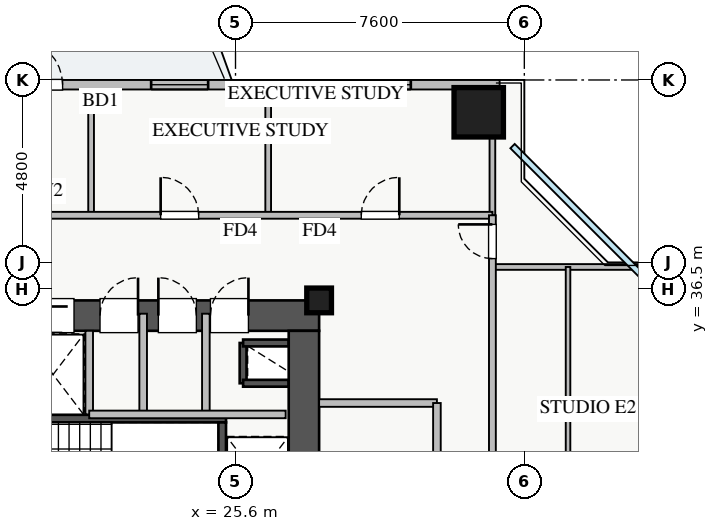
"""IFC4 building model, lengths in metres.
Left out: names, types, materials, properties, quantities, classifications, styles, units other than length and angle.
Written with IfcOpenShell. Run it as: python <this file> out.ifc"""

import sys

from ifc_helpers import new_model, si_unit, direction, frame, frame_2d, origin, origin_2d, place, context, subcontext, project, spatial, rectangle, extrude, source, transform, mapped, element, fill, save


model = new_model("IFC4")
c1 = context("Model", 3, precision=1e-05, world=origin(), true_north=direction((0.0, 1.0)))
c2 = subcontext(c1, "Body", "Model", "MODEL_VIEW")
j1 = project(units=[si_unit("LENGTHUNIT", "METRE"), si_unit("PLANEANGLEUNIT", "RADIAN")], contexts=[c1])
p1 = place(None, origin())
s1 = spatial("IfcSite", under=j1, at=p1, CompositionType="ELEMENT")
p2 = place(p1, origin())
s2 = spatial("IfcBuilding", under=s1, at=p2, CompositionType="ELEMENT")
p3 = place(p2, frame((0.0, 0.0, 60.0)))
s3 = spatial("IfcBuildingStorey", under=s2, at=p3, CompositionType="ELEMENT", Elevation=60.0)
p4 = place(p3, frame((25.8, 34.02, 0.0), z_axis=(0.0, 0.0, 1.0), x_axis=(0.0, 1.0, 0.0)))
e1 = element("IfcWall", 1, at=p4, inside=s3, PredefinedType="SHEAR", context=c2, shape_type="SweptSolid", body=[
    extrude(rectangle(XDim=1.06, YDim=0.18, at=frame_2d((0.53, 0.0))), origin(), (0.0, 0.0, 1.0), 3.07),
])
for number, where, z_axis, x_axis in (
    (2, (25.8, 35.08, 0.0), (0.0, 0.0, 1.0), (1.0, 0.0, 0.0)),
    (3, (25.8, 34.02, 0.0), (0.0, 0.0, 1.0), (1.0, 0.0, 0.0)),
):
    element("IfcWall", number, at=place(p3, frame(where, z_axis=z_axis, x_axis=x_axis)), inside=s3, PredefinedType="SHEAR", context=c2, shape_type="SweptSolid", body=[
        extrude(rectangle(XDim=1.2, YDim=0.18, at=frame_2d((0.6, 0.0))), origin(), (0.0, 0.0, 1.0), 3.07),
    ])
p5 = place(p3, frame((19.88, 33.2, 0.0), z_axis=(0.0, 0.0, 1.0), x_axis=(1.0, 0.0, 0.0)))
e4 = element("IfcWall", 4, at=p5, inside=s3, PredefinedType="SHEAR", context=c2, shape_type="SweptSolid", body=[
    extrude(rectangle(XDim=1.87, YDim=0.18, at=frame_2d((0.935, 0.0))), origin(), (0.0, 0.0, 1.0), 3.07),
])
p6 = place(p3, frame((18.2, 33.09, 0.0), z_axis=(0.0, 0.0, 1.0), x_axis=(1.0, 0.0, 0.0)))
e5 = element("IfcWall", 5, at=p6, inside=s3, PredefinedType="SHEAR", context=c2, shape_type="SweptSolid", body=[
    extrude(rectangle(XDim=7.15, YDim=0.2, at=frame_2d((3.575, 0.0))), origin(), (0.0, 0.0, 1.0), 3.25),
])
p7 = place(p6, frame((0.35, 0.0, 0.0)))
e6 = element("IfcOpeningElement", 6, at=p7, cuts=e5, PredefinedType="OPENING", context=c2, shape_type="SweptSolid", body=[
    extrude(rectangle(XDim=1.1, YDim=2.05, at=frame_2d((0.55, 1.025))), frame((0.0, 0.11, 0.0), z_axis=(0.0, -1.0, 0.0), x_axis=(1.0, 0.0, 0.0)), (0.0, 0.0, 1.0), 0.22),
])
p8 = place(p3, frame((25.25, 30.05, 0.0), z_axis=(0.0, 0.0, 1.0), x_axis=(0.0, 1.0, 0.0)))
e7 = element("IfcWall", 7, at=p8, inside=s3, PredefinedType="SHEAR", context=c2, shape_type="SweptSolid", body=[
    extrude(rectangle(XDim=2.94, YDim=0.2, at=frame_2d((1.47, 0.0))), origin(), (0.0, 0.0, 1.0), 3.25),
])
p9 = place(p3, frame((10.2, 35.8, 0.0), z_axis=(0.0, 0.0, 1.0), x_axis=(1.0, 0.0, 0.0)))
e8 = element("IfcWall", 8, at=p9, inside=s3, PredefinedType="SHEAR", context=c2, shape_type="SweptSolid", body=[
    extrude(rectangle(XDim=17.6, YDim=0.8, at=frame_2d((8.8, 0.0))), origin(), (0.0, 0.0, 1.0), 3.25),
])
p10 = place(p9, frame((1.15, 0.0, 0.0)))
e9 = element("IfcOpeningElement", 9, at=p10, cuts=e8, PredefinedType="OPENING", context=c2, shape_type="SweptSolid", body=[
    extrude(rectangle(XDim=1.1, YDim=2.05, at=frame_2d((0.55, 1.025))), frame((0.0, 0.41, 0.0), z_axis=(0.0, -1.0, 0.0), x_axis=(1.0, 0.0, 0.0)), (0.0, 0.0, 1.0), 0.82),
])
p11 = place(p9, frame((8.3, 0.0, 0.0)))
e10 = element("IfcOpeningElement", 10, at=p11, cuts=e8, PredefinedType="OPENING", context=c2, shape_type="SweptSolid", body=[
    extrude(rectangle(XDim=1.1, YDim=2.05, at=frame_2d((0.55, 1.025))), frame((0.0, 0.41, 0.0), z_axis=(0.0, -1.0, 0.0), x_axis=(1.0, 0.0, 0.0)), (0.0, 0.0, 1.0), 0.82),
])
p12 = place(p9, frame((10.05, 0.0, 0.0)))
e11 = element("IfcOpeningElement", 11, at=p12, cuts=e8, PredefinedType="OPENING", context=c2, shape_type="SweptSolid", body=[
    extrude(rectangle(XDim=1.1, YDim=2.05, at=frame_2d((0.55, 1.025))), frame((0.0, 0.41, 0.0), z_axis=(0.0, -1.0, 0.0), x_axis=(1.0, 0.0, 0.0)), (0.0, 0.0, 1.0), 0.82),
])
p13 = place(p9, frame((14.74, 0.0, 0.0)))
e12 = element("IfcOpeningElement", 12, at=p13, cuts=e8, PredefinedType="OPENING", context=c2, shape_type="SweptSolid", body=[
    extrude(rectangle(XDim=1.0, YDim=2.05, at=frame_2d((0.5, 1.025))), frame((0.0, 0.41, 0.0), z_axis=(0.0, -1.0, 0.0), x_axis=(1.0, 0.0, 0.0)), (0.0, 0.0, 1.0), 0.82),
])
p14 = place(p9, frame((11.835, 0.0, 0.0)))
e13 = element("IfcOpeningElement", 13, at=p14, cuts=e8, PredefinedType="OPENING", context=c2, shape_type="SweptSolid", body=[
    extrude(rectangle(XDim=1.0, YDim=2.05, at=frame_2d((0.5, 1.025))), frame((0.0, 0.41, 0.0), z_axis=(0.0, -1.0, 0.0), x_axis=(1.0, 0.0, 0.0)), (0.0, 0.0, 1.0), 0.82),
])
p15 = place(p9, frame((13.37, 0.0, 0.0)))
e14 = element("IfcOpeningElement", 14, at=p15, cuts=e8, PredefinedType="OPENING", context=c2, shape_type="SweptSolid", body=[
    extrude(rectangle(XDim=1.0, YDim=2.05, at=frame_2d((0.5, 1.025))), frame((0.0, 0.41, 0.0), z_axis=(0.0, -1.0, 0.0), x_axis=(1.0, 0.0, 0.0)), (0.0, 0.0, 1.0), 0.82),
])
p16 = place(p3, frame((27.4, 29.8, 0.0), z_axis=(0.0, 0.0, 1.0), x_axis=(0.0, 1.0, 0.0)))
e15 = element("IfcWall", 15, at=p16, inside=s3, PredefinedType="SHEAR", context=c2, shape_type="SweptSolid", body=[
    extrude(rectangle(XDim=5.6, YDim=0.8, at=frame_2d((2.8, 0.0))), origin(), (0.0, 0.0, 1.0), 3.25),
])
p17 = place(p16, frame((1.1, 0.0, 0.0)))
e16 = element("IfcOpeningElement", 16, at=p17, cuts=e15, PredefinedType="OPENING", context=c2, shape_type="SweptSolid", body=[
    extrude(rectangle(XDim=1.3, YDim=2.05, at=frame_2d((0.65, 1.025))), frame((0.0, 0.41, 0.0), z_axis=(0.0, -1.0, 0.0), x_axis=(1.0, 0.0, 0.0)), (0.0, 0.0, 1.0), 0.82),
])
m1 = source(origin(), c2, "Body", "SweptSolid", [
    extrude(rectangle(XDim=0.65, YDim=0.65, at=origin_2d()), origin(), (0.0, 0.0, 1.0), 3.25),
])
p18 = place(p3, frame((27.8, 36.2, 0.0), z_axis=(0.0, 0.0, 1.0), x_axis=(1.0, 0.0, 0.0)))
e17 = element("IfcColumn", 17, at=p18, inside=s3, PredefinedType="PILASTER", context=c2, shape_type="MappedRepresentation", body=[
    mapped(m1, transform((0.0, 0.0, 0.0), x_axis=(1.0, 0.0, 0.0), y_axis=(0.0, 1.0, 0.0), z_axis=(0.0, 0.0, 1.0), scale=1.0)),
])
m2 = source(origin(), c2, "Body", "SweptSolid", [
    extrude(rectangle(XDim=1.3, YDim=1.3, at=origin_2d()), origin(), (0.0, 0.0, 1.0), 3.25),
])
p19 = place(p3, frame((32.0, 41.15, 0.0), z_axis=(0.0, 0.0, 1.0), x_axis=(1.0, 0.0, 0.0)))
e18 = element("IfcColumn", 18, at=p19, inside=s3, PredefinedType="COLUMN", context=c2, shape_type="MappedRepresentation", body=[
    mapped(m2, transform((0.0, 0.0, 0.0), x_axis=(1.0, 0.0, 0.0), y_axis=(0.0, 1.0, 0.0), z_axis=(0.0, 0.0, 1.0), scale=1.0)),
])
p20 = place(p3, frame((5.45, 41.875, 0.0), z_axis=(0.0, 0.0, 1.0), x_axis=(1.0, 0.0, 0.0)))
e19 = element("IfcWall", 19, at=p20, inside=s3, PredefinedType="STANDARD", context=c2, shape_type="SweptSolid", body=[
    extrude(rectangle(XDim=27.1, YDim=0.25, at=frame_2d((13.55, 0.0))), origin(), (0.0, 0.0, 1.0), 2.61),
])
p21 = place(p20, frame((14.4, 0.0, 0.0)))
e20 = element("IfcOpeningElement", 20, at=p21, cuts=e19, PredefinedType="OPENING", context=c2, shape_type="SweptSolid", body=[
    extrude(rectangle(XDim=1.2, YDim=2.1, at=frame_2d((0.6, 1.05))), frame((0.0, 0.135, 0.0), z_axis=(0.0, -1.0, 0.0), x_axis=(1.0, 0.0, 0.0)), (0.0, 0.0, 1.0), 0.27),
])
p22 = place(p20, frame((1.465, 0.0, 0.9)))
e21 = element("IfcOpeningElement", 21, at=p22, cuts=e19, PredefinedType="OPENING", context=c2, shape_type="SweptSolid", body=[
    extrude(rectangle(XDim=1.5, YDim=1.5, at=frame_2d((0.75, 0.75))), frame((0.0, 0.135, 0.0), z_axis=(0.0, -1.0, 0.0), x_axis=(1.0, 0.0, 0.0)), (0.0, 0.0, 1.0), 0.27),
])
p23 = place(p20, frame((9.263, 0.0, 0.9)))
e22 = element("IfcOpeningElement", 22, at=p23, cuts=e19, PredefinedType="OPENING", context=c2, shape_type="SweptSolid", body=[
    extrude(rectangle(XDim=1.8, YDim=1.45, at=frame_2d((0.9, 0.725))), frame((0.0, 0.135, 0.0), z_axis=(0.0, -1.0, 0.0), x_axis=(1.0, 0.0, 0.0)), (0.0, 0.0, 1.0), 0.27),
])
p24 = place(p20, frame((17.93, 0.0, 0.9)))
e23 = element("IfcOpeningElement", 23, at=p24, cuts=e19, PredefinedType="OPENING", context=c2, shape_type="SweptSolid", body=[
    extrude(rectangle(XDim=1.5, YDim=1.5, at=frame_2d((0.75, 0.75))), frame((0.0, 0.135, 0.0), z_axis=(0.0, -1.0, 0.0), x_axis=(1.0, 0.0, 0.0)), (0.0, 0.0, 1.0), 0.27),
])
p25 = place(p20, frame((22.663, 0.0, 0.9)))
e24 = element("IfcOpeningElement", 24, at=p25, cuts=e19, PredefinedType="OPENING", context=c2, shape_type="SweptSolid", body=[
    extrude(rectangle(XDim=2.1, YDim=1.48, at=frame_2d((1.05, 0.74))), frame((0.0, 0.135, 0.0), z_axis=(0.0, -1.0, 0.0), x_axis=(1.0, 0.0, 0.0)), (0.0, 0.0, 1.0), 0.27),
])
p26 = place(p20, frame((4.63, 0.0, 0.9)))
e25 = element("IfcOpeningElement", 25, at=p26, cuts=e19, PredefinedType="OPENING", context=c2, shape_type="SweptSolid", body=[
    extrude(rectangle(XDim=2.4, YDim=1.5, at=frame_2d((1.2, 0.75))), frame((0.0, 0.135, 0.0), z_axis=(0.0, -1.0, 0.0), x_axis=(1.0, 0.0, 0.0)), (0.0, 0.0, 1.0), 0.27),
])
p27 = place(p3, frame((27.8, 33.5, 0.0), z_axis=(0.0, 0.0, 1.0), x_axis=(1.0, 0.0, 0.0)))
e26 = element("IfcWall", 26, at=p27, inside=s3, PredefinedType="PARTITIONING", context=c2, shape_type="SweptSolid", body=[
    extrude(rectangle(XDim=3.1, YDim=0.2, at=frame_2d((1.55, 0.0))), origin(), (0.0, 0.0, 1.0), 3.07),
])
p28 = place(p3, frame((30.9, 29.6, 0.0), z_axis=(0.0, 0.0, 1.0), x_axis=(0.0, 1.0, 0.0)))
e27 = element("IfcWall", 27, at=p28, inside=s3, PredefinedType="PARTITIONING", context=c2, shape_type="SweptSolid", body=[
    extrude(rectangle(XDim=3.9, YDim=0.2, at=frame_2d((1.95, 0.0))), origin(), (0.0, 0.0, 1.0), 3.07),
])
p29 = place(p28, frame((1.4, 0.0, 0.0)))
e28 = element("IfcOpeningElement", 28, at=p29, cuts=e27, PredefinedType="OPENING", context=c2, shape_type="SweptSolid", body=[
    extrude(rectangle(XDim=1.1, YDim=2.05, at=frame_2d((0.55, 1.025))), frame((0.0, 0.11, 0.0), z_axis=(0.0, -1.0, 0.0), x_axis=(1.0, 0.0, 0.0)), (0.0, 0.0, 1.0), 0.22),
])
p30 = place(p3, frame((24.82, 33.2, 0.0), z_axis=(0.0, 0.0, 1.0), x_axis=(0.0, 1.0, 0.0)))
e29 = element("IfcWall", 29, at=p30, inside=s3, PredefinedType="PARTITIONING", context=c2, shape_type="SweptSolid", body=[
    extrude(rectangle(XDim=2.65, YDim=0.2, at=frame_2d((1.325, 0.0))), origin(), (0.0, 0.0, 1.0), 3.07),
])
p31 = place(p3, frame((21.75, 33.2, 0.0), z_axis=(0.0, 0.0, 1.0), x_axis=(0.0, 1.0, 0.0)))
e30 = element("IfcWall", 30, at=p31, inside=s3, PredefinedType="PARTITIONING", context=c2, shape_type="SweptSolid", body=[
    extrude(rectangle(XDim=2.2, YDim=0.2, at=frame_2d((1.1, 0.0))), origin(), (0.0, 0.0, 1.0), 3.07),
])
p32 = place(p3, frame((23.17, 33.2, 0.0), z_axis=(0.0, 0.0, 1.0), x_axis=(0.0, 1.0, 0.0)))
e31 = element("IfcWall", 31, at=p32, inside=s3, PredefinedType="PARTITIONING", context=c2, shape_type="SweptSolid", body=[
    extrude(rectangle(XDim=2.65, YDim=0.2, at=frame_2d((1.325, 0.0))), origin(), (0.0, 0.0, 1.0), 3.07),
])
p33 = place(p3, frame((21.75, 33.2, 0.0), z_axis=(0.0, 0.0, 1.0), x_axis=(1.0, 0.0, 0.0)))
e32 = element("IfcWall", 32, at=p33, inside=s3, PredefinedType="PARTITIONING", context=c2, shape_type="SweptSolid", body=[
    extrude(rectangle(XDim=5.17, YDim=0.2, at=frame_2d((2.585, 0.0))), origin(), (0.0, 0.0, 1.0), 3.07),
])
for number, where, z_axis, x_axis in (
    (33, (21.8, 38.44, 0.0), (0.0, 0.0, 1.0), (0.0, 1.0, 0.0)),
    (34, (26.46, 38.44, 0.0), (0.0, 0.0, 1.0), (0.0, 1.0, 0.0)),
    (35, (32.36, 38.44, 0.0), (0.0, 0.0, 1.0), (0.0, 1.0, 0.0)),
):
    element("IfcWall", number, at=place(p3, frame(where, z_axis=z_axis, x_axis=x_axis)), inside=s3, PredefinedType="PARTITIONING", context=c2, shape_type="SweptSolid", body=[
        extrude(rectangle(XDim=3.31, YDim=0.15, at=frame_2d((1.655, 0.0))), origin(), (0.0, 0.0, 1.0), 3.07),
    ])
p34 = place(p3, frame((8.75, 38.44, 0.0), z_axis=(0.0, 0.0, 1.0), x_axis=(1.0, 0.0, 0.0)))
e36 = element("IfcWall", 36, at=p34, inside=s3, PredefinedType="PARTITIONING", context=c2, shape_type="SweptSolid", body=[
    extrude(rectangle(XDim=23.61, YDim=0.18, at=frame_2d((11.805, 0.0))), origin(), (0.0, 0.0, 1.0), 3.07),
])
p35 = place(p34, frame((2.03, 0.0, 0.0)))
e37 = element("IfcOpeningElement", 37, at=p35, cuts=e36, PredefinedType="OPENING", context=c2, shape_type="SweptSolid", body=[
    extrude(rectangle(XDim=1.0, YDim=2.05, at=frame_2d((0.5, 1.025))), frame((0.0, 0.1, 0.0), z_axis=(0.0, -1.0, 0.0), x_axis=(1.0, 0.0, 0.0)), (0.0, 0.0, 1.0), 0.2),
])
p36 = place(p34, frame((8.555, 0.0, 0.0)))
e38 = element("IfcOpeningElement", 38, at=p36, cuts=e36, PredefinedType="OPENING", context=c2, shape_type="SweptSolid", body=[
    extrude(rectangle(XDim=1.0, YDim=2.05, at=frame_2d((0.5, 1.025))), frame((0.0, 0.1, 0.0), z_axis=(0.0, -1.0, 0.0), x_axis=(1.0, 0.0, 0.0)), (0.0, 0.0, 1.0), 0.2),
])
p37 = place(p34, frame((14.88, 0.0, 0.0)))
e39 = element("IfcOpeningElement", 39, at=p37, cuts=e36, PredefinedType="OPENING", context=c2, shape_type="SweptSolid", body=[
    extrude(rectangle(XDim=1.0, YDim=2.05, at=frame_2d((0.5, 1.025))), frame((0.0, 0.1, 0.0), z_axis=(0.0, -1.0, 0.0), x_axis=(1.0, 0.0, 0.0)), (0.0, 0.0, 1.0), 0.2),
])
p38 = place(p34, frame((20.16, 0.0, 0.0)))
e40 = element("IfcOpeningElement", 40, at=p38, cuts=e36, PredefinedType="OPENING", context=c2, shape_type="SweptSolid", body=[
    extrude(rectangle(XDim=1.0, YDim=2.05, at=frame_2d((0.5, 1.025))), frame((0.0, 0.1, 0.0), z_axis=(0.0, -1.0, 0.0), x_axis=(1.0, 0.0, 0.0)), (0.0, 0.0, 1.0), 0.2),
])
p39 = place(p3, frame((32.36, 37.08, 0.0), z_axis=(0.0, 0.0, 1.0), x_axis=(1.0, 0.0, 0.0)))
e41 = element("IfcWall", 41, at=p39, inside=s3, PredefinedType="PARTITIONING", context=c2, shape_type="SweptSolid", body=[
    extrude(rectangle(XDim=5.39, YDim=0.15, at=frame_2d((2.695, 0.0))), origin(), (0.0, 0.0, 1.0), 3.07),
])
p40 = place(p3, frame((34.35, 30.35, 0.0), z_axis=(0.0, 0.0, 1.0), x_axis=(0.0, 1.0, 0.0)))
e42 = element("IfcWall", 42, at=p40, inside=s3, PredefinedType="PLUMBINGWALL", context=c2, shape_type="SweptSolid", body=[
    extrude(rectangle(XDim=6.73, YDim=0.12, at=frame_2d((3.365, 0.0))), origin(), (0.0, 0.0, 1.0), 3.07),
])
p41 = place(p3, frame((32.36, 7.21, 0.0), z_axis=(0.0, 0.0, 1.0), x_axis=(0.0, 1.0, 0.0)))
e43 = element("IfcWall", 43, at=p41, inside=s3, PredefinedType="PARTITIONING", context=c2, shape_type="SweptSolid", body=[
    extrude(rectangle(XDim=31.23, YDim=0.18, at=frame_2d((15.615, 0.0))), origin(), (0.0, 0.0, 1.0), 2.821),
])
p42 = place(p41, frame((30.09, 0.0, 0.0)))
e44 = element("IfcOpeningElement", 44, at=p42, cuts=e43, PredefinedType="OPENING", context=c2, shape_type="SweptSolid", body=[
    extrude(rectangle(XDim=0.9, YDim=2.05, at=frame_2d((0.45, 1.025))), frame((0.0, 0.1, 0.0), z_axis=(0.0, -1.0, 0.0), x_axis=(1.0, 0.0, 0.0)), (0.0, 0.0, 1.0), 0.2),
])
p43 = place(p41, frame((0.415, 0.0, 0.0)))
e45 = element("IfcOpeningElement", 45, at=p43, cuts=e43, PredefinedType="OPENING", context=c2, shape_type="SweptSolid", body=[
    extrude(rectangle(XDim=0.9, YDim=2.05, at=frame_2d((0.45, 1.025))), frame((0.0, 0.1, 0.0), z_axis=(0.0, -1.0, 0.0), x_axis=(1.0, 0.0, 0.0)), (0.0, 0.0, 1.0), 0.2),
])
p44 = place(p41, frame((7.975, 0.0, 0.0)))
e46 = element("IfcOpeningElement", 46, at=p44, cuts=e43, PredefinedType="OPENING", context=c2, shape_type="SweptSolid", body=[
    extrude(rectangle(XDim=1.0, YDim=2.05, at=frame_2d((0.5, 1.025))), frame((0.0, 0.1, 0.0), z_axis=(0.0, -1.0, 0.0), x_axis=(1.0, 0.0, 0.0)), (0.0, 0.0, 1.0), 0.2),
])
p45 = place(p41, frame((18.5, 0.0, 0.0)))
e47 = element("IfcOpeningElement", 47, at=p45, cuts=e43, PredefinedType="OPENING", context=c2, shape_type="SweptSolid", body=[
    extrude(rectangle(XDim=1.0, YDim=2.05, at=frame_2d((0.5, 1.025))), frame((0.0, 0.1, 0.0), z_axis=(0.0, -1.0, 0.0), x_axis=(1.0, 0.0, 0.0)), (0.0, 0.0, 1.0), 0.2),
])
m3 = source(origin(), c2, "Body", "SweptSolid", [
    extrude(rectangle(XDim=1.2, YDim=2.1, at=frame_2d((0.6, 1.05))), frame((0.0, 0.025, 0.0), z_axis=(0.0, -1.0, 0.0), x_axis=(1.0, 0.0, 0.0)), (0.0, 0.0, 1.0), 0.05),
])
p46 = place(p21, origin())
e48 = element("IfcDoor", 48, at=p46, inside=s3, OperationType="SINGLE_SWING_LEFT", PredefinedType="DOOR", context=c2, shape_type="MappedRepresentation", body=[
    mapped(m3, transform((0.0, 0.0, 0.0), x_axis=(1.0, 0.0, 0.0), y_axis=(0.0, 1.0, 0.0), z_axis=(0.0, 0.0, 1.0), scale=1.0)),
])
fill(e20, e48)
m4 = source(origin(), c2, "Body", "SweptSolid", [
    extrude(rectangle(XDim=1.5, YDim=1.5, at=frame_2d((0.75, 0.75))), frame((0.0, 0.03, 0.0), z_axis=(0.0, -1.0, 0.0), x_axis=(1.0, 0.0, 0.0)), (0.0, 0.0, 1.0), 0.06),
])
p47 = place(p24, origin())
e49 = element("IfcWindow", 49, at=p47, inside=s3, PartitioningType="DOUBLE_PANEL_VERTICAL", PredefinedType="WINDOW", context=c2, shape_type="MappedRepresentation", body=[
    mapped(m4, transform((0.0, 0.0, 0.0), x_axis=(1.0, 0.0, 0.0), y_axis=(0.0, 1.0, 0.0), z_axis=(0.0, 0.0, 1.0), scale=1.0)),
])
fill(e23, e49)
m5 = source(origin(), c2, "Body", "SweptSolid", [
    extrude(rectangle(XDim=2.1, YDim=1.48, at=frame_2d((1.05, 0.74))), frame((0.0, 0.03, 0.0), z_axis=(0.0, -1.0, 0.0), x_axis=(1.0, 0.0, 0.0)), (0.0, 0.0, 1.0), 0.06),
])
p48 = place(p25, origin())
e50 = element("IfcWindow", 50, at=p48, inside=s3, PartitioningType="TRIPLE_PANEL_VERTICAL", PredefinedType="WINDOW", context=c2, shape_type="MappedRepresentation", body=[
    mapped(m5, transform((0.0, 0.0, 0.0), x_axis=(1.0, 0.0, 0.0), y_axis=(0.0, 1.0, 0.0), z_axis=(0.0, 0.0, 1.0), scale=1.0)),
])
fill(e24, e50)
m6 = source(origin(), c2, "Body", "SweptSolid", [
    extrude(rectangle(XDim=1.1, YDim=2.05, at=frame_2d((0.55, 1.025))), frame((0.0, 0.025, 0.0), z_axis=(0.0, -1.0, 0.0), x_axis=(1.0, 0.0, 0.0)), (0.0, 0.0, 1.0), 0.05),
])
p49 = place(p12, origin())
e51 = element("IfcDoor", 51, at=p49, inside=s3, OperationType="SLIDING_TO_LEFT", PredefinedType="DOOR", context=c2, shape_type="MappedRepresentation", body=[
    mapped(m6, transform((0.0, 0.0, 0.0), x_axis=(1.0, 0.0, 0.0), y_axis=(0.0, 1.0, 0.0), z_axis=(0.0, 0.0, 1.0), scale=1.0)),
])
fill(e11, e51)
m7 = source(origin(), c2, "Body", "SweptSolid", [
    extrude(rectangle(XDim=1.0, YDim=2.05, at=frame_2d((0.5, 1.025))), frame((0.0, 0.025, 0.0), z_axis=(0.0, -1.0, 0.0), x_axis=(1.0, 0.0, 0.0)), (0.0, 0.0, 1.0), 0.05),
])
p50 = place(p13, origin())
e52 = element("IfcDoor", 52, at=p50, inside=s3, OperationType="SINGLE_SWING_RIGHT", PredefinedType="DOOR", context=c2, shape_type="MappedRepresentation", body=[
    mapped(m7, transform((0.0, 0.0, 0.0), x_axis=(1.0, 0.0, 0.0), y_axis=(0.0, 1.0, 0.0), z_axis=(0.0, 0.0, 1.0), scale=1.0)),
])
fill(e12, e52)
p51 = place(p14, origin())
e53 = element("IfcDoor", 53, at=p51, inside=s3, OperationType="SINGLE_SWING_RIGHT", PredefinedType="DOOR", context=c2, shape_type="MappedRepresentation", body=[
    mapped(m7, transform((0.0, 0.0, 0.0), x_axis=(1.0, 0.0, 0.0), y_axis=(0.0, 1.0, 0.0), z_axis=(0.0, 0.0, 1.0), scale=1.0)),
])
fill(e13, e53)
p52 = place(p15, origin())
e54 = element("IfcDoor", 54, at=p52, inside=s3, OperationType="SINGLE_SWING_LEFT", PredefinedType="DOOR", context=c2, shape_type="MappedRepresentation", body=[
    mapped(m7, transform((0.0, 0.0, 0.0), x_axis=(1.0, 0.0, 0.0), y_axis=(0.0, 1.0, 0.0), z_axis=(0.0, 0.0, 1.0), scale=1.0)),
])
fill(e14, e54)
p53 = place(p37, origin())
e55 = element("IfcDoor", 55, at=p53, inside=s3, OperationType="SINGLE_SWING_LEFT", PredefinedType="DOOR", context=c2, shape_type="MappedRepresentation", body=[
    mapped(m7, transform((0.0, 0.0, 0.0), x_axis=(1.0, 0.0, 0.0), y_axis=(0.0, 1.0, 0.0), z_axis=(0.0, 0.0, 1.0), scale=1.0)),
])
fill(e39, e55)
p54 = place(p38, origin())
e56 = element("IfcDoor", 56, at=p54, inside=s3, OperationType="SINGLE_SWING_RIGHT", PredefinedType="DOOR", context=c2, shape_type="MappedRepresentation", body=[
    mapped(m7, transform((0.0, 0.0, 0.0), x_axis=(1.0, 0.0, 0.0), y_axis=(0.0, 1.0, 0.0), z_axis=(0.0, 0.0, 1.0), scale=1.0)),
])
fill(e40, e56)
m8 = source(origin(), c2, "Body", "SweptSolid", [
    extrude(rectangle(XDim=0.9, YDim=2.05, at=frame_2d((0.45, 1.025))), frame((0.0, 0.025, 0.0), z_axis=(0.0, -1.0, 0.0), x_axis=(1.0, 0.0, 0.0)), (0.0, 0.0, 1.0), 0.05),
])
p55 = place(p42, origin())
e57 = element("IfcDoor", 57, at=p55, inside=s3, OperationType="SINGLE_SWING_RIGHT", PredefinedType="DOOR", context=c2, shape_type="MappedRepresentation", body=[
    mapped(m8, transform((0.0, 0.0, 0.0), x_axis=(1.0, 0.0, 0.0), y_axis=(0.0, 1.0, 0.0), z_axis=(0.0, 0.0, 1.0), scale=1.0)),
])
fill(e44, e57)
save(model, sys.argv[1])
